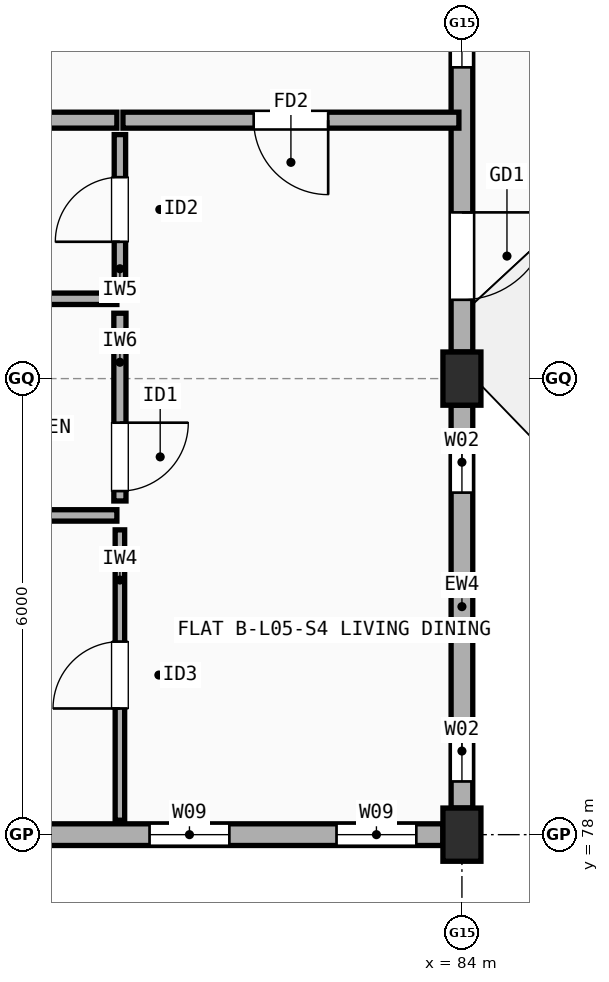
"""IFC4 building model, lengths in metres.
Left out: names, types, materials, properties, quantities, classifications, styles, units other than length and angle.
Written with IfcOpenShell. Run it as: python <this file> out.ifc"""

import sys

from ifc_helpers import new_model, si_unit, direction, frame, frame_2d, origin, origin_2d, place, context, subcontext, project, spatial, rectangle, extrude, element, fill, save


model = new_model("IFC4")
c1 = context("Model", 3, precision=1e-05, world=origin(), true_north=direction((0.0, 1.0)))
c2 = subcontext(c1, "Body", "Model", "MODEL_VIEW")
j1 = project(units=[si_unit("LENGTHUNIT", "METRE"), si_unit("PLANEANGLEUNIT", "RADIAN")], contexts=[c1])
p1 = place(None, origin())
s1 = spatial("IfcSite", under=j1, at=p1, CompositionType="ELEMENT")
p2 = place(p1, origin())
s2 = spatial("IfcBuilding", under=s1, at=p2, CompositionType="ELEMENT")
p3 = place(p2, frame((0.0, 0.0, 17.3)))
s3 = spatial("IfcBuildingStorey", under=s2, at=p3, CompositionType="ELEMENT", Elevation=17.3)
for number, where, z_axis, x_axis in (
    (1, (84.0, 78.0, 0.0), (0.0, 0.0, 1.0), (1.0, 0.0, 0.0)),
    (2, (84.0, 84.0, 0.0), (0.0, 0.0, 1.0), (1.0, 0.0, 0.0)),
):
    element("IfcColumn", number, at=place(p3, frame(where, z_axis=z_axis, x_axis=x_axis)), inside=s3, PredefinedType="COLUMN", context=c2, shape_type="SweptSolid", body=[
        extrude(rectangle(XDim=0.5, YDim=0.7, at=origin_2d()), origin(), (0.0, 0.0, 1.0), 2.965),
    ])
p4 = place(p3, frame((78.25, 78.0, 0.0), z_axis=(0.0, 0.0, 1.0), x_axis=(1.0, 0.0, 0.0)))
e3 = element("IfcWall", 3, at=p4, inside=s3, PredefinedType="STANDARD", context=c2, shape_type="SweptSolid", body=[
    extrude(rectangle(XDim=5.5, YDim=0.285, at=frame_2d((2.75, 0.0))), origin(), (0.0, 0.0, 1.0), 2.447),
])
p5 = place(p4, frame((1.64, 0.0, 0.9)))
e4 = element("IfcOpeningElement", 4, at=p5, cuts=e3, PredefinedType="OPENING", context=c2, shape_type="SweptSolid", body=[
    extrude(rectangle(XDim=1.05, YDim=1.35, at=frame_2d((0.525, 0.675))), frame((0.0, 0.152, 0.0), z_axis=(0.0, -1.0, 0.0), x_axis=(1.0, 0.0, 0.0)), (0.0, 0.0, 1.0), 0.305),
])
p6 = place(p4, frame((4.1, 0.0, 0.9)))
e5 = element("IfcOpeningElement", 5, at=p6, cuts=e3, PredefinedType="OPENING", context=c2, shape_type="SweptSolid", body=[
    extrude(rectangle(XDim=1.05, YDim=1.35, at=frame_2d((0.525, 0.675))), frame((0.0, 0.152, 0.0), z_axis=(0.0, -1.0, 0.0), x_axis=(1.0, 0.0, 0.0)), (0.0, 0.0, 1.0), 0.305),
])
p7 = place(p3, frame((84.0, 78.35, 0.0), z_axis=(0.0, 0.0, 1.0), x_axis=(0.0, 1.0, 0.0)))
e6 = element("IfcWall", 6, at=p7, inside=s3, PredefinedType="STANDARD", context=c2, shape_type="SweptSolid", body=[
    extrude(rectangle(XDim=5.3, YDim=0.285, at=frame_2d((2.65, 0.0))), origin(), (0.0, 0.0, 1.0), 2.447),
])
p8 = place(p7, frame((0.35, 0.0, 0.9)))
e7 = element("IfcOpeningElement", 7, at=p8, cuts=e6, PredefinedType="OPENING", context=c2, shape_type="SweptSolid", body=[
    extrude(rectangle(XDim=0.8, YDim=1.2, at=frame_2d((0.4, 0.6))), frame((0.0, 0.152, 0.0), z_axis=(0.0, -1.0, 0.0), x_axis=(1.0, 0.0, 0.0)), (0.0, 0.0, 1.0), 0.305),
])
p9 = place(p7, frame((4.15, 0.0, 0.9)))
e8 = element("IfcOpeningElement", 8, at=p9, cuts=e6, PredefinedType="OPENING", context=c2, shape_type="SweptSolid", body=[
    extrude(rectangle(XDim=0.8, YDim=1.2, at=frame_2d((0.4, 0.6))), frame((0.0, 0.152, 0.0), z_axis=(0.0, -1.0, 0.0), x_axis=(1.0, 0.0, 0.0)), (0.0, 0.0, 1.0), 0.305),
])
p10 = place(p3, frame((84.0, 84.35, 0.0), z_axis=(0.0, 0.0, 1.0), x_axis=(0.0, 1.0, 0.0)))
e9 = element("IfcWall", 9, at=p10, inside=s3, PredefinedType="STANDARD", context=c2, shape_type="SweptSolid", body=[
    extrude(rectangle(XDim=5.3, YDim=0.285, at=frame_2d((2.65, 0.0))), origin(), (0.0, 0.0, 1.0), 2.447),
])
p11 = place(p10, frame((0.687, 0.0, 0.0)))
e10 = element("IfcOpeningElement", 10, at=p11, cuts=e9, PredefinedType="OPENING", context=c2, shape_type="SweptSolid", body=[
    extrude(rectangle(XDim=1.15, YDim=2.15, at=frame_2d((0.575, 1.075))), frame((0.0, 0.152, 0.0), z_axis=(0.0, -1.0, 0.0), x_axis=(1.0, 0.0, 0.0)), (0.0, 0.0, 1.0), 0.305),
])
p12 = place(p10, frame((3.745, 0.0, 0.9)))
e11 = element("IfcOpeningElement", 11, at=p12, cuts=e9, PredefinedType="OPENING", context=c2, shape_type="SweptSolid", body=[
    extrude(rectangle(XDim=0.9, YDim=1.3, at=frame_2d((0.45, 0.65))), frame((0.0, 0.152, 0.0), z_axis=(0.0, -1.0, 0.0), x_axis=(1.0, 0.0, 0.0)), (0.0, 0.0, 1.0), 0.305),
])
p13 = place(p3, frame((75.04, 87.4, 0.0), z_axis=(0.0, 0.0, 1.0), x_axis=(1.0, 0.0, 0.0)))
e12 = element("IfcWall", 12, at=p13, inside=s3, PredefinedType="SOLIDWALL", context=c2, shape_type="SweptSolid", body=[
    extrude(rectangle(XDim=4.42, YDim=0.21, at=frame_2d((2.21, 0.0))), origin(), (0.0, 0.0, 1.0), 2.447),
])
p14 = place(p3, frame((79.54, 87.4, 0.0), z_axis=(0.0, 0.0, 1.0), x_axis=(1.0, 0.0, 0.0)))
e13 = element("IfcWall", 13, at=p14, inside=s3, PredefinedType="SOLIDWALL", context=c2, shape_type="SweptSolid", body=[
    extrude(rectangle(XDim=4.42, YDim=0.21, at=frame_2d((2.21, 0.0))), origin(), (0.0, 0.0, 1.0), 2.447),
])
p15 = place(p14, frame((1.72, 0.0, 0.0)))
e14 = element("IfcOpeningElement", 14, at=p15, cuts=e13, PredefinedType="OPENING", context=c2, shape_type="SweptSolid", body=[
    extrude(rectangle(XDim=0.98, YDim=2.15, at=frame_2d((0.49, 1.075))), frame((0.0, 0.115, 0.0), z_axis=(0.0, -1.0, 0.0), x_axis=(1.0, 0.0, 0.0)), (0.0, 0.0, 1.0), 0.23),
])
p16 = place(p3, frame((79.5, 78.19, 0.0), z_axis=(0.0, 0.0, 1.0), x_axis=(0.0, 1.0, 0.0)))
e15 = element("IfcWall", 15, at=p16, inside=s3, PredefinedType="PARTITIONING", context=c2, shape_type="SweptSolid", body=[
    extrude(rectangle(XDim=3.82, YDim=0.125, at=frame_2d((1.91, 0.0))), origin(), (0.0, 0.0, 1.0), 2.965),
])
p17 = place(p16, frame((1.47, 0.0, 0.0)))
e16 = element("IfcOpeningElement", 16, at=p17, cuts=e15, PredefinedType="OPENING", context=c2, shape_type="SweptSolid", body=[
    extrude(rectangle(XDim=0.88, YDim=2.1, at=frame_2d((0.44, 1.05))), frame((0.0, 0.073, 0.0), z_axis=(0.0, -1.0, 0.0), x_axis=(1.0, 0.0, 0.0)), (0.0, 0.0, 1.0), 0.145),
])
p18 = place(p3, frame((79.5, 82.39, 0.0), z_axis=(0.0, 0.0, 1.0), x_axis=(0.0, 1.0, 0.0)))
e17 = element("IfcWall", 17, at=p18, inside=s3, PredefinedType="PLUMBINGWALL", context=c2, shape_type="SweptSolid", body=[
    extrude(rectangle(XDim=2.47, YDim=0.16, at=frame_2d((1.235, 0.0))), origin(), (0.0, 0.0, 1.0), 2.447),
])
p19 = place(p18, frame((0.13, 0.0, 0.0)))
e18 = element("IfcOpeningElement", 18, at=p19, cuts=e17, PredefinedType="OPENING", context=c2, shape_type="SweptSolid", body=[
    extrude(rectangle(XDim=0.9, YDim=2.1, at=frame_2d((0.45, 1.05))), frame((0.0, 0.09, 0.0), z_axis=(0.0, -1.0, 0.0), x_axis=(1.0, 0.0, 0.0)), (0.0, 0.0, 1.0), 0.18),
])
p20 = place(p3, frame((79.5, 85.24, 0.0), z_axis=(0.0, 0.0, 1.0), x_axis=(0.0, 1.0, 0.0)))
e19 = element("IfcWall", 19, at=p20, inside=s3, PredefinedType="PARTITIONING", context=c2, shape_type="SweptSolid", body=[
    extrude(rectangle(XDim=1.97, YDim=0.15, at=frame_2d((0.985, 0.0))), origin(), (0.0, 0.0, 1.0), 2.965),
])
p21 = place(p20, frame((0.56, 0.0, 0.0)))
e20 = element("IfcOpeningElement", 20, at=p21, cuts=e19, PredefinedType="OPENING", context=c2, shape_type="SweptSolid", body=[
    extrude(rectangle(XDim=0.85, YDim=2.1, at=frame_2d((0.425, 1.05))), frame((0.0, 0.085, 0.0), z_axis=(0.0, -1.0, 0.0), x_axis=(1.0, 0.0, 0.0)), (0.0, 0.0, 1.0), 0.17),
])
for number, where, z_axis, x_axis in (
    (21, (75.04, 82.2, 0.0), (0.0, 0.0, 1.0), (1.0, 0.0, 0.0)),
    (22, (75.04, 85.05, 0.0), (0.0, 0.0, 1.0), (1.0, 0.0, 0.0)),
):
    element("IfcWall", number, at=place(p3, frame(where, z_axis=z_axis, x_axis=x_axis)), inside=s3, PredefinedType="PARTITIONING", context=c2, shape_type="SweptSolid", body=[
        extrude(rectangle(XDim=4.42, YDim=0.15, at=frame_2d((2.21, 0.0))), origin(), (0.0, 0.0, 1.0), 2.447),
    ])
p22 = place(p5, origin())
e23 = element("IfcWindow", 23, at=p22, inside=s3, PartitioningType="SINGLE_PANEL", PredefinedType="WINDOW", context=c2, shape_type="SweptSolid", body=[
    extrude(rectangle(XDim=1.05, YDim=1.35, at=frame_2d((0.525, 0.675))), frame((0.0, 0.03, 0.0), z_axis=(0.0, -1.0, 0.0), x_axis=(1.0, 0.0, 0.0)), (0.0, 0.0, 1.0), 0.06),
])
fill(e4, e23)
p23 = place(p6, origin())
e24 = element("IfcWindow", 24, at=p23, inside=s3, PartitioningType="SINGLE_PANEL", PredefinedType="WINDOW", context=c2, shape_type="SweptSolid", body=[
    extrude(rectangle(XDim=1.05, YDim=1.35, at=frame_2d((0.525, 0.675))), frame((0.0, 0.03, 0.0), z_axis=(0.0, -1.0, 0.0), x_axis=(1.0, 0.0, 0.0)), (0.0, 0.0, 1.0), 0.06),
])
fill(e5, e24)
p24 = place(p8, origin())
e25 = element("IfcWindow", 25, at=p24, inside=s3, PartitioningType="SINGLE_PANEL", PredefinedType="WINDOW", context=c2, shape_type="SweptSolid", body=[
    extrude(rectangle(XDim=0.8, YDim=1.2, at=frame_2d((0.4, 0.6))), frame((0.0, 0.03, 0.0), z_axis=(0.0, -1.0, 0.0), x_axis=(1.0, 0.0, 0.0)), (0.0, 0.0, 1.0), 0.06),
])
fill(e7, e25)
p25 = place(p9, origin())
e26 = element("IfcWindow", 26, at=p25, inside=s3, PartitioningType="SINGLE_PANEL", PredefinedType="WINDOW", context=c2, shape_type="SweptSolid", body=[
    extrude(rectangle(XDim=0.8, YDim=1.2, at=frame_2d((0.4, 0.6))), frame((0.0, 0.03, 0.0), z_axis=(0.0, -1.0, 0.0), x_axis=(1.0, 0.0, 0.0)), (0.0, 0.0, 1.0), 0.06),
])
fill(e8, e26)
p26 = place(p11, frame((1.15, 0.0, 0.0), z_axis=(0.0, 0.0, 1.0), x_axis=(-1.0, 0.0, 0.0)))
e27 = element("IfcDoor", 27, at=p26, inside=s3, OperationType="SINGLE_SWING_RIGHT", PredefinedType="DOOR", context=c2, shape_type="SweptSolid", body=[
    extrude(rectangle(XDim=1.15, YDim=2.15, at=frame_2d((0.575, 1.075))), frame((0.0, 0.025, 0.0), z_axis=(0.0, -1.0, 0.0), x_axis=(1.0, 0.0, 0.0)), (0.0, 0.0, 1.0), 0.05),
])
fill(e10, e27)
p27 = place(p12, origin())
e28 = element("IfcWindow", 28, at=p27, inside=s3, PartitioningType="SINGLE_PANEL", PredefinedType="WINDOW", context=c2, shape_type="SweptSolid", body=[
    extrude(rectangle(XDim=0.9, YDim=1.3, at=frame_2d((0.45, 0.65))), frame((0.0, 0.03, 0.0), z_axis=(0.0, -1.0, 0.0), x_axis=(1.0, 0.0, 0.0)), (0.0, 0.0, 1.0), 0.06),
])
fill(e11, e28)
p28 = place(p15, origin())
e29 = element("IfcDoor", 29, at=p28, inside=s3, OperationType="SINGLE_SWING_RIGHT", PredefinedType="DOOR", context=c2, shape_type="SweptSolid", body=[
    extrude(rectangle(XDim=0.98, YDim=2.15, at=frame_2d((0.49, 1.075))), frame((0.0, 0.025, 0.0), z_axis=(0.0, -1.0, 0.0), x_axis=(1.0, 0.0, 0.0)), (0.0, 0.0, 1.0), 0.05),
])
fill(e14, e29)
p29 = place(p17, origin())
e30 = element("IfcDoor", 30, at=p29, inside=s3, OperationType="SINGLE_SWING_LEFT", PredefinedType="DOOR", context=c2, shape_type="SweptSolid", body=[
    extrude(rectangle(XDim=0.88, YDim=2.1, at=frame_2d((0.44, 1.05))), frame((0.0, 0.025, 0.0), z_axis=(0.0, -1.0, 0.0), x_axis=(1.0, 0.0, 0.0)), (0.0, 0.0, 1.0), 0.05),
])
fill(e16, e30)
p30 = place(p19, origin())
e31 = element("IfcDoor", 31, at=p30, inside=s3, OperationType="SINGLE_SWING_RIGHT", PredefinedType="DOOR", context=c2, shape_type="SweptSolid", body=[
    extrude(rectangle(XDim=0.9, YDim=2.1, at=frame_2d((0.45, 1.05))), frame((0.0, 0.025, 0.0), z_axis=(0.0, -1.0, 0.0), x_axis=(1.0, 0.0, 0.0)), (0.0, 0.0, 1.0), 0.05),
])
fill(e18, e31)
p31 = place(p21, origin())
e32 = element("IfcDoor", 32, at=p31, inside=s3, OperationType="SINGLE_SWING_LEFT", PredefinedType="DOOR", context=c2, shape_type="SweptSolid", body=[
    extrude(rectangle(XDim=0.85, YDim=2.1, at=frame_2d((0.425, 1.05))), frame((0.0, 0.025, 0.0), z_axis=(0.0, -1.0, 0.0), x_axis=(1.0, 0.0, 0.0)), (0.0, 0.0, 1.0), 0.05),
])
fill(e20, e32)
save(model, sys.argv[1])
